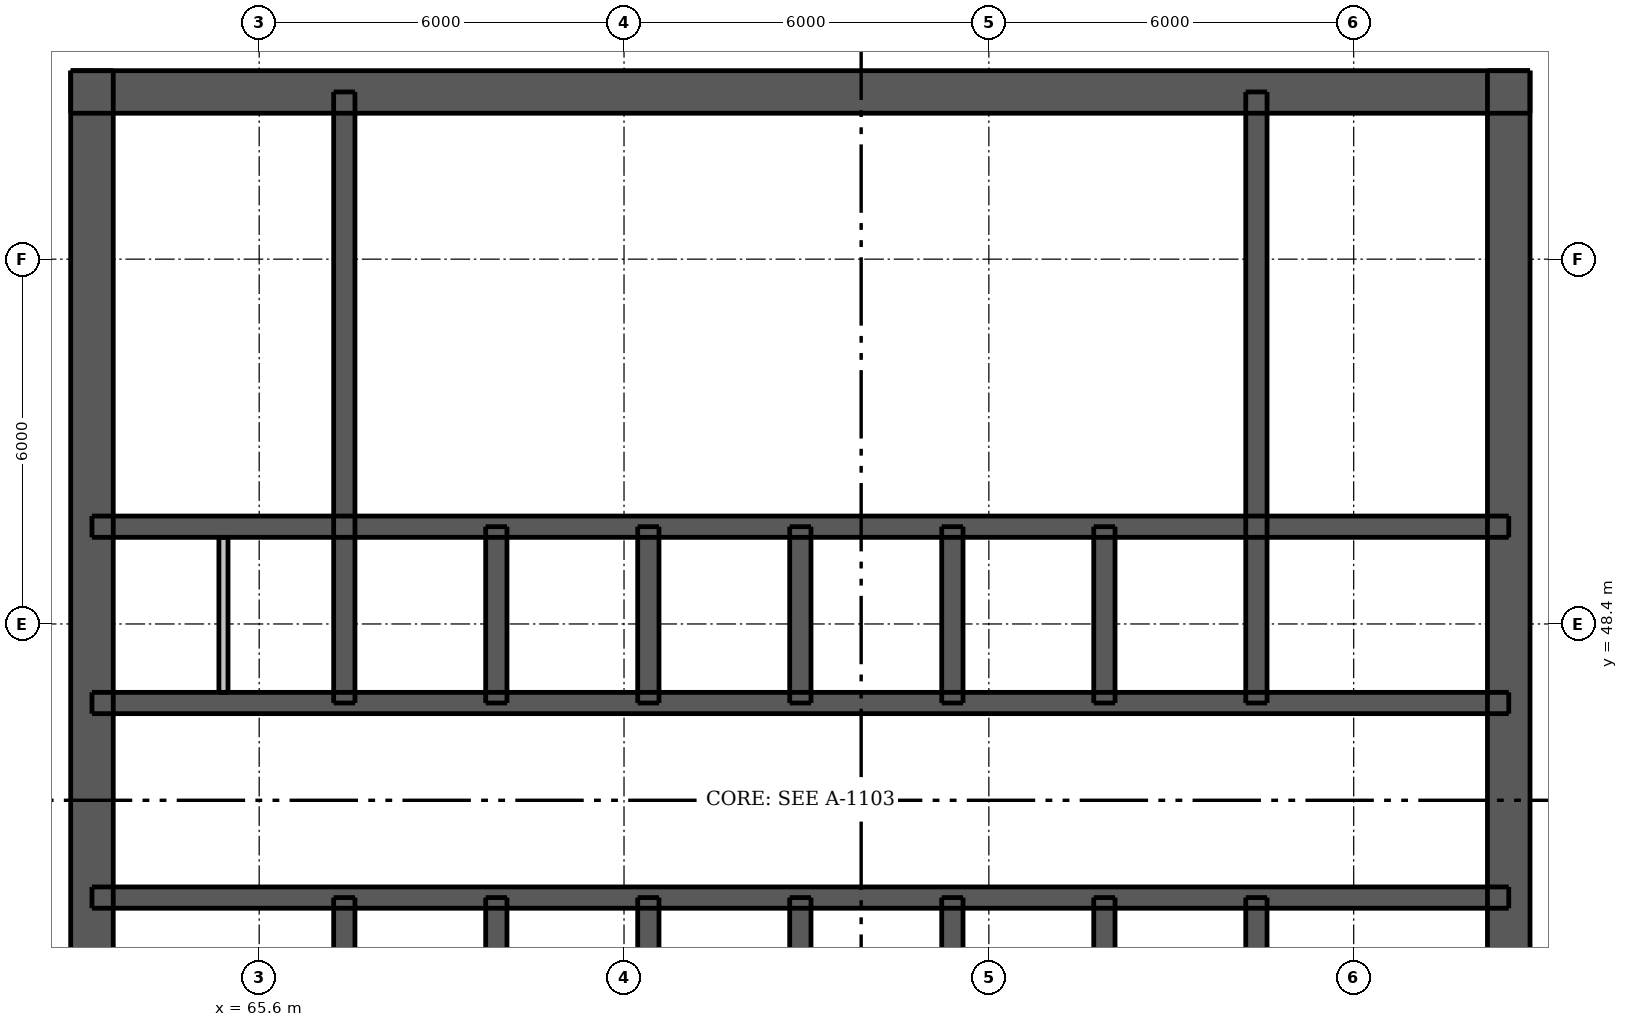
"""IFC4 building model, lengths in metres.
Left out: names, types, materials, properties, quantities, classifications, styles, units other than length and angle.
Written with IfcOpenShell. Run it as: python <this file> out.ifc"""

import sys

from ifc_helpers import new_model, si_unit, direction, frame, frame_2d, origin, place, context, subcontext, project, spatial, rectangle, extrude, element, fill, save


model = new_model("IFC4")
c1 = context("Model", 3, precision=1e-05, world=origin(), true_north=direction((0.0, 1.0)))
c2 = subcontext(c1, "Body", "Model", "MODEL_VIEW")
j1 = project(units=[si_unit("LENGTHUNIT", "METRE"), si_unit("PLANEANGLEUNIT", "RADIAN")], contexts=[c1])
p1 = place(None, origin())
s1 = spatial("IfcSite", under=j1, at=p1, CompositionType="ELEMENT")
p2 = place(p1, origin())
s2 = spatial("IfcBuilding", under=s1, at=p2, CompositionType="ELEMENT")
p3 = place(p2, frame((0.0, 0.0, 154.9)))
s3 = spatial("IfcBuildingStorey", under=s2, at=p3, CompositionType="ELEMENT", Elevation=154.9)
p4 = place(p3, frame((62.5, 57.15, 0.0), z_axis=(0.0, 0.0, 1.0), x_axis=(1.0, 0.0, 0.0)))
e1 = element("IfcWall", 1, at=p4, inside=s3, PredefinedType="SHEAR", context=c2, shape_type="SweptSolid", body=[
    extrude(rectangle(XDim=24.0, YDim=0.7, at=frame_2d((12.0, 0.0))), origin(), (0.0, 0.0, 1.0), 3.05),
])
p5 = place(p4, frame((20.938, 0.0, 0.0)))
e2 = element("IfcOpeningElement", 2, at=p5, cuts=e1, PredefinedType="OPENING", context=c2, shape_type="SweptSolid", body=[
    extrude(rectangle(XDim=1.1, YDim=2.1, at=frame_2d((0.55, 1.05))), frame((0.0, 0.36, 0.0), z_axis=(0.0, -1.0, 0.0), x_axis=(1.0, 0.0, 0.0)), (0.0, 0.0, 1.0), 0.72),
])
p6 = place(p4, frame((1.962, 0.0, 0.0)))
e3 = element("IfcOpeningElement", 3, at=p6, cuts=e1, PredefinedType="OPENING", context=c2, shape_type="SweptSolid", body=[
    extrude(rectangle(XDim=1.1, YDim=2.1, at=frame_2d((0.55, 1.05))), frame((0.0, 0.36, 0.0), z_axis=(0.0, -1.0, 0.0), x_axis=(1.0, 0.0, 0.0)), (0.0, 0.0, 1.0), 0.72),
])
p7 = place(p4, frame((11.55, 0.0, 0.0)))
e4 = element("IfcOpeningElement", 4, at=p7, cuts=e1, PredefinedType="OPENING", context=c2, shape_type="SweptSolid", body=[
    extrude(rectangle(XDim=0.9, YDim=2.1, at=frame_2d((0.45, 1.05))), frame((0.0, 0.36, 0.0), z_axis=(0.0, -1.0, 0.0), x_axis=(1.0, 0.0, 0.0)), (0.0, 0.0, 1.0), 0.72),
])
p8 = place(p3, frame((62.85, 33.5, 0.0), z_axis=(0.0, 0.0, 1.0), x_axis=(0.0, 1.0, 0.0)))
e5 = element("IfcWall", 5, at=p8, inside=s3, PredefinedType="SHEAR", context=c2, shape_type="SweptSolid", body=[
    extrude(rectangle(XDim=24.0, YDim=0.7, at=frame_2d((12.0, 0.0))), origin(), (0.0, 0.0, 1.0), 3.05),
])
p9 = place(p8, frame((11.2, 0.0, 0.0)))
e6 = element("IfcOpeningElement", 6, at=p9, cuts=e5, PredefinedType="OPENING", context=c2, shape_type="SweptSolid", body=[
    extrude(rectangle(XDim=1.6, YDim=2.1, at=frame_2d((0.8, 1.05))), frame((0.0, 0.36, 0.0), z_axis=(0.0, -1.0, 0.0), x_axis=(1.0, 0.0, 0.0)), (0.0, 0.0, 1.0), 0.72),
])
p10 = place(p3, frame((86.15, 33.5, 0.0), z_axis=(0.0, 0.0, 1.0), x_axis=(0.0, 1.0, 0.0)))
e7 = element("IfcWall", 7, at=p10, inside=s3, PredefinedType="SHEAR", context=c2, shape_type="SweptSolid", body=[
    extrude(rectangle(XDim=24.0, YDim=0.7, at=frame_2d((12.0, 0.0))), origin(), (0.0, 0.0, 1.0), 3.05),
])
p11 = place(p10, frame((11.2, 0.0, 0.0)))
e8 = element("IfcOpeningElement", 8, at=p11, cuts=e7, PredefinedType="OPENING", context=c2, shape_type="SweptSolid", body=[
    extrude(rectangle(XDim=1.6, YDim=2.1, at=frame_2d((0.8, 1.05))), frame((0.0, 0.36, 0.0), z_axis=(0.0, -1.0, 0.0), x_axis=(1.0, 0.0, 0.0)), (0.0, 0.0, 1.0), 0.72),
])
p12 = place(p3, frame((62.85, 43.9, 0.0), z_axis=(0.0, 0.0, 1.0), x_axis=(1.0, 0.0, 0.0)))
e9 = element("IfcWall", 9, at=p12, inside=s3, PredefinedType="SHEAR", context=c2, shape_type="SweptSolid", body=[
    extrude(rectangle(XDim=23.3, YDim=0.35, at=frame_2d((11.65, 0.0))), origin(), (0.0, 0.0, 1.0), 3.05),
])
p13 = place(p12, frame((1.712, 0.0, 0.0)))
e10 = element("IfcOpeningElement", 10, at=p13, cuts=e9, PredefinedType="OPENING", context=c2, shape_type="SweptSolid", body=[
    extrude(rectangle(XDim=0.9, YDim=2.1, at=frame_2d((0.45, 1.05))), frame((0.0, 0.185, 0.0), z_axis=(0.0, -1.0, 0.0), x_axis=(1.0, 0.0, 0.0)), (0.0, 0.0, 1.0), 0.37),
])
p14 = place(p12, frame((20.688, 0.0, 0.0)))
e11 = element("IfcOpeningElement", 11, at=p14, cuts=e9, PredefinedType="OPENING", context=c2, shape_type="SweptSolid", body=[
    extrude(rectangle(XDim=0.9, YDim=2.1, at=frame_2d((0.45, 1.05))), frame((0.0, 0.185, 0.0), z_axis=(0.0, -1.0, 0.0), x_axis=(1.0, 0.0, 0.0)), (0.0, 0.0, 1.0), 0.37),
])
p15 = place(p3, frame((62.85, 47.1, 0.0), z_axis=(0.0, 0.0, 1.0), x_axis=(1.0, 0.0, 0.0)))
e12 = element("IfcWall", 12, at=p15, inside=s3, PredefinedType="SHEAR", context=c2, shape_type="SweptSolid", body=[
    extrude(rectangle(XDim=23.3, YDim=0.35, at=frame_2d((11.65, 0.0))), origin(), (0.0, 0.0, 1.0), 3.05),
])
p16 = place(p15, frame((0.806, 0.0, 0.0)))
e13 = element("IfcOpeningElement", 13, at=p16, cuts=e12, PredefinedType="OPENING", context=c2, shape_type="SweptSolid", body=[
    extrude(rectangle(XDim=0.9, YDim=2.1, at=frame_2d((0.45, 1.05))), frame((0.0, 0.185, 0.0), z_axis=(0.0, -1.0, 0.0), x_axis=(1.0, 0.0, 0.0)), (0.0, 0.0, 1.0), 0.37),
])
p17 = place(p15, frame((2.619, 0.0, 0.0)))
e14 = element("IfcOpeningElement", 14, at=p17, cuts=e12, PredefinedType="OPENING", context=c2, shape_type="SweptSolid", body=[
    extrude(rectangle(XDim=0.9, YDim=2.1, at=frame_2d((0.45, 1.05))), frame((0.0, 0.185, 0.0), z_axis=(0.0, -1.0, 0.0), x_axis=(1.0, 0.0, 0.0)), (0.0, 0.0, 1.0), 0.37),
])
p18 = place(p15, frame((20.688, 0.0, 0.0)))
e15 = element("IfcOpeningElement", 15, at=p18, cuts=e12, PredefinedType="OPENING", context=c2, shape_type="SweptSolid", body=[
    extrude(rectangle(XDim=0.9, YDim=2.1, at=frame_2d((0.45, 1.05))), frame((0.0, 0.185, 0.0), z_axis=(0.0, -1.0, 0.0), x_axis=(1.0, 0.0, 0.0)), (0.0, 0.0, 1.0), 0.37),
])
p19 = place(p15, frame((4.85, 0.0, 0.0)))
e16 = element("IfcOpeningElement", 16, at=p19, cuts=e12, PredefinedType="OPENING", context=c2, shape_type="SweptSolid", body=[
    extrude(rectangle(XDim=1.1, YDim=2.1, at=frame_2d((0.55, 1.05))), frame((0.0, 0.185, 0.0), z_axis=(0.0, -1.0, 0.0), x_axis=(1.0, 0.0, 0.0)), (0.0, 0.0, 1.0), 0.37),
])
p20 = place(p15, frame((7.35, 0.0, 0.0)))
e17 = element("IfcOpeningElement", 17, at=p20, cuts=e12, PredefinedType="OPENING", context=c2, shape_type="SweptSolid", body=[
    extrude(rectangle(XDim=1.1, YDim=2.1, at=frame_2d((0.55, 1.05))), frame((0.0, 0.185, 0.0), z_axis=(0.0, -1.0, 0.0), x_axis=(1.0, 0.0, 0.0)), (0.0, 0.0, 1.0), 0.37),
])
p21 = place(p15, frame((9.85, 0.0, 0.0)))
e18 = element("IfcOpeningElement", 18, at=p21, cuts=e12, PredefinedType="OPENING", context=c2, shape_type="SweptSolid", body=[
    extrude(rectangle(XDim=1.1, YDim=2.1, at=frame_2d((0.55, 1.05))), frame((0.0, 0.185, 0.0), z_axis=(0.0, -1.0, 0.0), x_axis=(1.0, 0.0, 0.0)), (0.0, 0.0, 1.0), 0.37),
])
p22 = place(p15, frame((12.35, 0.0, 0.0)))
e19 = element("IfcOpeningElement", 19, at=p22, cuts=e12, PredefinedType="OPENING", context=c2, shape_type="SweptSolid", body=[
    extrude(rectangle(XDim=1.1, YDim=2.1, at=frame_2d((0.55, 1.05))), frame((0.0, 0.185, 0.0), z_axis=(0.0, -1.0, 0.0), x_axis=(1.0, 0.0, 0.0)), (0.0, 0.0, 1.0), 0.37),
])
p23 = place(p15, frame((14.85, 0.0, 0.0)))
e20 = element("IfcOpeningElement", 20, at=p23, cuts=e12, PredefinedType="OPENING", context=c2, shape_type="SweptSolid", body=[
    extrude(rectangle(XDim=1.1, YDim=2.1, at=frame_2d((0.55, 1.05))), frame((0.0, 0.185, 0.0), z_axis=(0.0, -1.0, 0.0), x_axis=(1.0, 0.0, 0.0)), (0.0, 0.0, 1.0), 0.37),
])
p24 = place(p15, frame((17.35, 0.0, 0.0)))
e21 = element("IfcOpeningElement", 21, at=p24, cuts=e12, PredefinedType="OPENING", context=c2, shape_type="SweptSolid", body=[
    extrude(rectangle(XDim=1.1, YDim=2.1, at=frame_2d((0.55, 1.05))), frame((0.0, 0.185, 0.0), z_axis=(0.0, -1.0, 0.0), x_axis=(1.0, 0.0, 0.0)), (0.0, 0.0, 1.0), 0.37),
])
p25 = place(p3, frame((62.85, 50.0, 0.0), z_axis=(0.0, 0.0, 1.0), x_axis=(1.0, 0.0, 0.0)))
e22 = element("IfcWall", 22, at=p25, inside=s3, PredefinedType="SHEAR", context=c2, shape_type="SweptSolid", body=[
    extrude(rectangle(XDim=23.3, YDim=0.35, at=frame_2d((11.65, 0.0))), origin(), (0.0, 0.0, 1.0), 3.05),
])
p26 = place(p3, frame((67.0, 33.85, 0.0), z_axis=(0.0, 0.0, 1.0), x_axis=(0.0, 1.0, 0.0)))
e23 = element("IfcWall", 23, at=p26, inside=s3, PredefinedType="SHEAR", context=c2, shape_type="SweptSolid", body=[
    extrude(rectangle(XDim=10.05, YDim=0.35, at=frame_2d((5.025, 0.0))), origin(), (0.0, 0.0, 1.0), 3.05),
])
p27 = place(p26, frame((0.55, 0.0, 0.0)))
e24 = element("IfcOpeningElement", 24, at=p27, cuts=e23, PredefinedType="OPENING", context=c2, shape_type="SweptSolid", body=[
    extrude(rectangle(XDim=1.1, YDim=2.1, at=frame_2d((0.55, 1.05))), frame((0.0, 0.185, 0.0), z_axis=(0.0, -1.0, 0.0), x_axis=(1.0, 0.0, 0.0)), (0.0, 0.0, 1.0), 0.37),
])
for number, where, z_axis, x_axis in (
    (25, (67.0, 47.1, 0.0), (0.0, 0.0, 1.0), (0.0, 1.0, 0.0)),
    (26, (82.0, 33.85, 0.0), (0.0, 0.0, 1.0), (0.0, 1.0, 0.0)),
    (27, (82.0, 47.1, 0.0), (0.0, 0.0, 1.0), (0.0, 1.0, 0.0)),
):
    element("IfcWall", number, at=place(p3, frame(where, z_axis=z_axis, x_axis=x_axis)), inside=s3, PredefinedType="SHEAR", context=c2, shape_type="SweptSolid", body=[
        extrude(rectangle(XDim=10.05, YDim=0.35, at=frame_2d((5.025, 0.0))), origin(), (0.0, 0.0, 1.0), 3.05),
    ])
for number, where, z_axis, x_axis in (
    (28, (69.5, 41.0, 0.0), (0.0, 0.0, 1.0), (0.0, 1.0, 0.0)),
    (29, (69.5, 47.1, 0.0), (0.0, 0.0, 1.0), (0.0, 1.0, 0.0)),
    (30, (72.0, 41.0, 0.0), (0.0, 0.0, 1.0), (0.0, 1.0, 0.0)),
    (31, (72.0, 47.1, 0.0), (0.0, 0.0, 1.0), (0.0, 1.0, 0.0)),
    (32, (74.5, 41.0, 0.0), (0.0, 0.0, 1.0), (0.0, 1.0, 0.0)),
    (33, (74.5, 47.1, 0.0), (0.0, 0.0, 1.0), (0.0, 1.0, 0.0)),
    (34, (77.0, 41.0, 0.0), (0.0, 0.0, 1.0), (0.0, 1.0, 0.0)),
    (35, (77.0, 47.1, 0.0), (0.0, 0.0, 1.0), (0.0, 1.0, 0.0)),
    (36, (79.5, 41.0, 0.0), (0.0, 0.0, 1.0), (0.0, 1.0, 0.0)),
    (37, (79.5, 47.1, 0.0), (0.0, 0.0, 1.0), (0.0, 1.0, 0.0)),
):
    element("IfcWall", number, at=place(p3, frame(where, z_axis=z_axis, x_axis=x_axis)), inside=s3, PredefinedType="SHEAR", context=c2, shape_type="SweptSolid", body=[
        extrude(rectangle(XDim=2.9, YDim=0.35, at=frame_2d((1.45, 0.0))), origin(), (0.0, 0.0, 1.0), 3.05),
    ])
p28 = place(p3, frame((65.012, 47.275, 0.0), z_axis=(0.0, 0.0, 1.0), x_axis=(0.0, 1.0, 0.0)))
e38 = element("IfcWall", 38, at=p28, inside=s3, PredefinedType="PLUMBINGWALL", context=c2, shape_type="SweptSolid", body=[
    extrude(rectangle(XDim=2.55, YDim=0.15, at=frame_2d((1.275, 0.0))), origin(), (0.0, 0.0, 1.0), 3.05),
])
p29 = place(p5, origin())
e39 = element("IfcDoor", 39, at=p29, inside=s3, OperationType="SINGLE_SWING_RIGHT", PredefinedType="DOOR", context=c2, shape_type="SweptSolid", body=[
    extrude(rectangle(XDim=1.1, YDim=2.1, at=frame_2d((0.55, 1.05))), frame((0.0, -0.288, 0.0), z_axis=(0.0, -1.0, 0.0), x_axis=(1.0, 0.0, 0.0)), (0.0, 0.0, 1.0), 0.05),
])
fill(e2, e39)
p30 = place(p6, origin())
e40 = element("IfcDoor", 40, at=p30, inside=s3, OperationType="SINGLE_SWING_LEFT", PredefinedType="DOOR", context=c2, shape_type="SweptSolid", body=[
    extrude(rectangle(XDim=1.1, YDim=2.1, at=frame_2d((0.55, 1.05))), frame((0.0, -0.288, 0.0), z_axis=(0.0, -1.0, 0.0), x_axis=(1.0, 0.0, 0.0)), (0.0, 0.0, 1.0), 0.05),
])
fill(e3, e40)
p31 = place(p9, origin())
e41 = element("IfcDoor", 41, at=p31, inside=s3, OperationType="DOUBLE_DOOR_SINGLE_SWING", PredefinedType="DOOR", context=c2, shape_type="SweptSolid", body=[
    extrude(rectangle(XDim=1.6, YDim=2.1, at=frame_2d((0.8, 1.05))), frame((0.0, -0.288, 0.0), z_axis=(0.0, -1.0, 0.0), x_axis=(1.0, 0.0, 0.0)), (0.0, 0.0, 1.0), 0.05),
])
fill(e6, e41)
p32 = place(p11, origin())
e42 = element("IfcDoor", 42, at=p32, inside=s3, OperationType="DOUBLE_DOOR_SINGLE_SWING", PredefinedType="DOOR", context=c2, shape_type="SweptSolid", body=[
    extrude(rectangle(XDim=1.6, YDim=2.1, at=frame_2d((0.8, 1.05))), frame((0.0, 0.337, 0.0), z_axis=(0.0, -1.0, 0.0), x_axis=(1.0, 0.0, 0.0)), (0.0, 0.0, 1.0), 0.05),
])
fill(e8, e42)
p33 = place(p13, origin())
e43 = element("IfcDoor", 43, at=p33, inside=s3, OperationType="SINGLE_SWING_LEFT", PredefinedType="DOOR", context=c2, shape_type="SweptSolid", body=[
    extrude(rectangle(XDim=0.9, YDim=2.1, at=frame_2d((0.45, 1.05))), frame((0.0, -0.112, 0.0), z_axis=(0.0, -1.0, 0.0), x_axis=(1.0, 0.0, 0.0)), (0.0, 0.0, 1.0), 0.05),
])
fill(e10, e43)
p34 = place(p14, origin())
e44 = element("IfcDoor", 44, at=p34, inside=s3, OperationType="SINGLE_SWING_LEFT", PredefinedType="DOOR", context=c2, shape_type="SweptSolid", body=[
    extrude(rectangle(XDim=0.9, YDim=2.1, at=frame_2d((0.45, 1.05))), frame((0.0, -0.112, 0.0), z_axis=(0.0, -1.0, 0.0), x_axis=(1.0, 0.0, 0.0)), (0.0, 0.0, 1.0), 0.05),
])
fill(e11, e44)
p35 = place(p16, origin())
e45 = element("IfcDoor", 45, at=p35, inside=s3, OperationType="SINGLE_SWING_LEFT", PredefinedType="DOOR", context=c2, shape_type="SweptSolid", body=[
    extrude(rectangle(XDim=0.9, YDim=2.1, at=frame_2d((0.45, 1.05))), frame((0.0, 0.163, 0.0), z_axis=(0.0, -1.0, 0.0), x_axis=(1.0, 0.0, 0.0)), (0.0, 0.0, 1.0), 0.05),
])
fill(e13, e45)
p36 = place(p17, origin())
e46 = element("IfcDoor", 46, at=p36, inside=s3, OperationType="SINGLE_SWING_RIGHT", PredefinedType="DOOR", context=c2, shape_type="SweptSolid", body=[
    extrude(rectangle(XDim=0.9, YDim=2.1, at=frame_2d((0.45, 1.05))), frame((0.0, 0.163, 0.0), z_axis=(0.0, -1.0, 0.0), x_axis=(1.0, 0.0, 0.0)), (0.0, 0.0, 1.0), 0.05),
])
fill(e14, e46)
p37 = place(p18, origin())
e47 = element("IfcDoor", 47, at=p37, inside=s3, OperationType="SINGLE_SWING_LEFT", PredefinedType="DOOR", context=c2, shape_type="SweptSolid", body=[
    extrude(rectangle(XDim=0.9, YDim=2.1, at=frame_2d((0.45, 1.05))), frame((0.0, 0.163, 0.0), z_axis=(0.0, -1.0, 0.0), x_axis=(1.0, 0.0, 0.0)), (0.0, 0.0, 1.0), 0.05),
])
fill(e15, e47)
p38 = place(p7, origin())
e48 = element("IfcDoor", 48, at=p38, inside=s3, OperationType="SINGLE_SWING_RIGHT", PredefinedType="DOOR", context=c2, shape_type="SweptSolid", body=[
    extrude(rectangle(XDim=0.9, YDim=2.1, at=frame_2d((0.45, 1.05))), frame((0.0, -0.288, 0.0), z_axis=(0.0, -1.0, 0.0), x_axis=(1.0, 0.0, 0.0)), (0.0, 0.0, 1.0), 0.05),
])
fill(e4, e48)
p39 = place(p19, origin())
e49 = element("IfcDoor", 49, at=p39, inside=s3, OperationType="DOUBLE_DOOR_SLIDING", PredefinedType="DOOR", context=c2, shape_type="SweptSolid", body=[
    extrude(rectangle(XDim=1.1, YDim=2.1, at=frame_2d((0.55, 1.05))), frame((0.0, 0.025, 0.0), z_axis=(0.0, -1.0, 0.0), x_axis=(1.0, 0.0, 0.0)), (0.0, 0.0, 1.0), 0.05),
])
fill(e16, e49)
p40 = place(p20, origin())
e50 = element("IfcDoor", 50, at=p40, inside=s3, OperationType="DOUBLE_DOOR_SLIDING", PredefinedType="DOOR", context=c2, shape_type="SweptSolid", body=[
    extrude(rectangle(XDim=1.1, YDim=2.1, at=frame_2d((0.55, 1.05))), frame((0.0, 0.025, 0.0), z_axis=(0.0, -1.0, 0.0), x_axis=(1.0, 0.0, 0.0)), (0.0, 0.0, 1.0), 0.05),
])
fill(e17, e50)
p41 = place(p21, origin())
e51 = element("IfcDoor", 51, at=p41, inside=s3, OperationType="DOUBLE_DOOR_SLIDING", PredefinedType="DOOR", context=c2, shape_type="SweptSolid", body=[
    extrude(rectangle(XDim=1.1, YDim=2.1, at=frame_2d((0.55, 1.05))), frame((0.0, 0.025, 0.0), z_axis=(0.0, -1.0, 0.0), x_axis=(1.0, 0.0, 0.0)), (0.0, 0.0, 1.0), 0.05),
])
fill(e18, e51)
p42 = place(p22, origin())
e52 = element("IfcDoor", 52, at=p42, inside=s3, OperationType="DOUBLE_DOOR_SLIDING", PredefinedType="DOOR", context=c2, shape_type="SweptSolid", body=[
    extrude(rectangle(XDim=1.1, YDim=2.1, at=frame_2d((0.55, 1.05))), frame((0.0, 0.025, 0.0), z_axis=(0.0, -1.0, 0.0), x_axis=(1.0, 0.0, 0.0)), (0.0, 0.0, 1.0), 0.05),
])
fill(e19, e52)
p43 = place(p23, origin())
e53 = element("IfcDoor", 53, at=p43, inside=s3, OperationType="DOUBLE_DOOR_SLIDING", PredefinedType="DOOR", context=c2, shape_type="SweptSolid", body=[
    extrude(rectangle(XDim=1.1, YDim=2.1, at=frame_2d((0.55, 1.05))), frame((0.0, 0.025, 0.0), z_axis=(0.0, -1.0, 0.0), x_axis=(1.0, 0.0, 0.0)), (0.0, 0.0, 1.0), 0.05),
])
fill(e20, e53)
p44 = place(p24, origin())
e54 = element("IfcDoor", 54, at=p44, inside=s3, OperationType="DOUBLE_DOOR_SLIDING", PredefinedType="DOOR", context=c2, shape_type="SweptSolid", body=[
    extrude(rectangle(XDim=1.1, YDim=2.1, at=frame_2d((0.55, 1.05))), frame((0.0, 0.025, 0.0), z_axis=(0.0, -1.0, 0.0), x_axis=(1.0, 0.0, 0.0)), (0.0, 0.0, 1.0), 0.05),
])
fill(e21, e54)
save(model, sys.argv[1])
